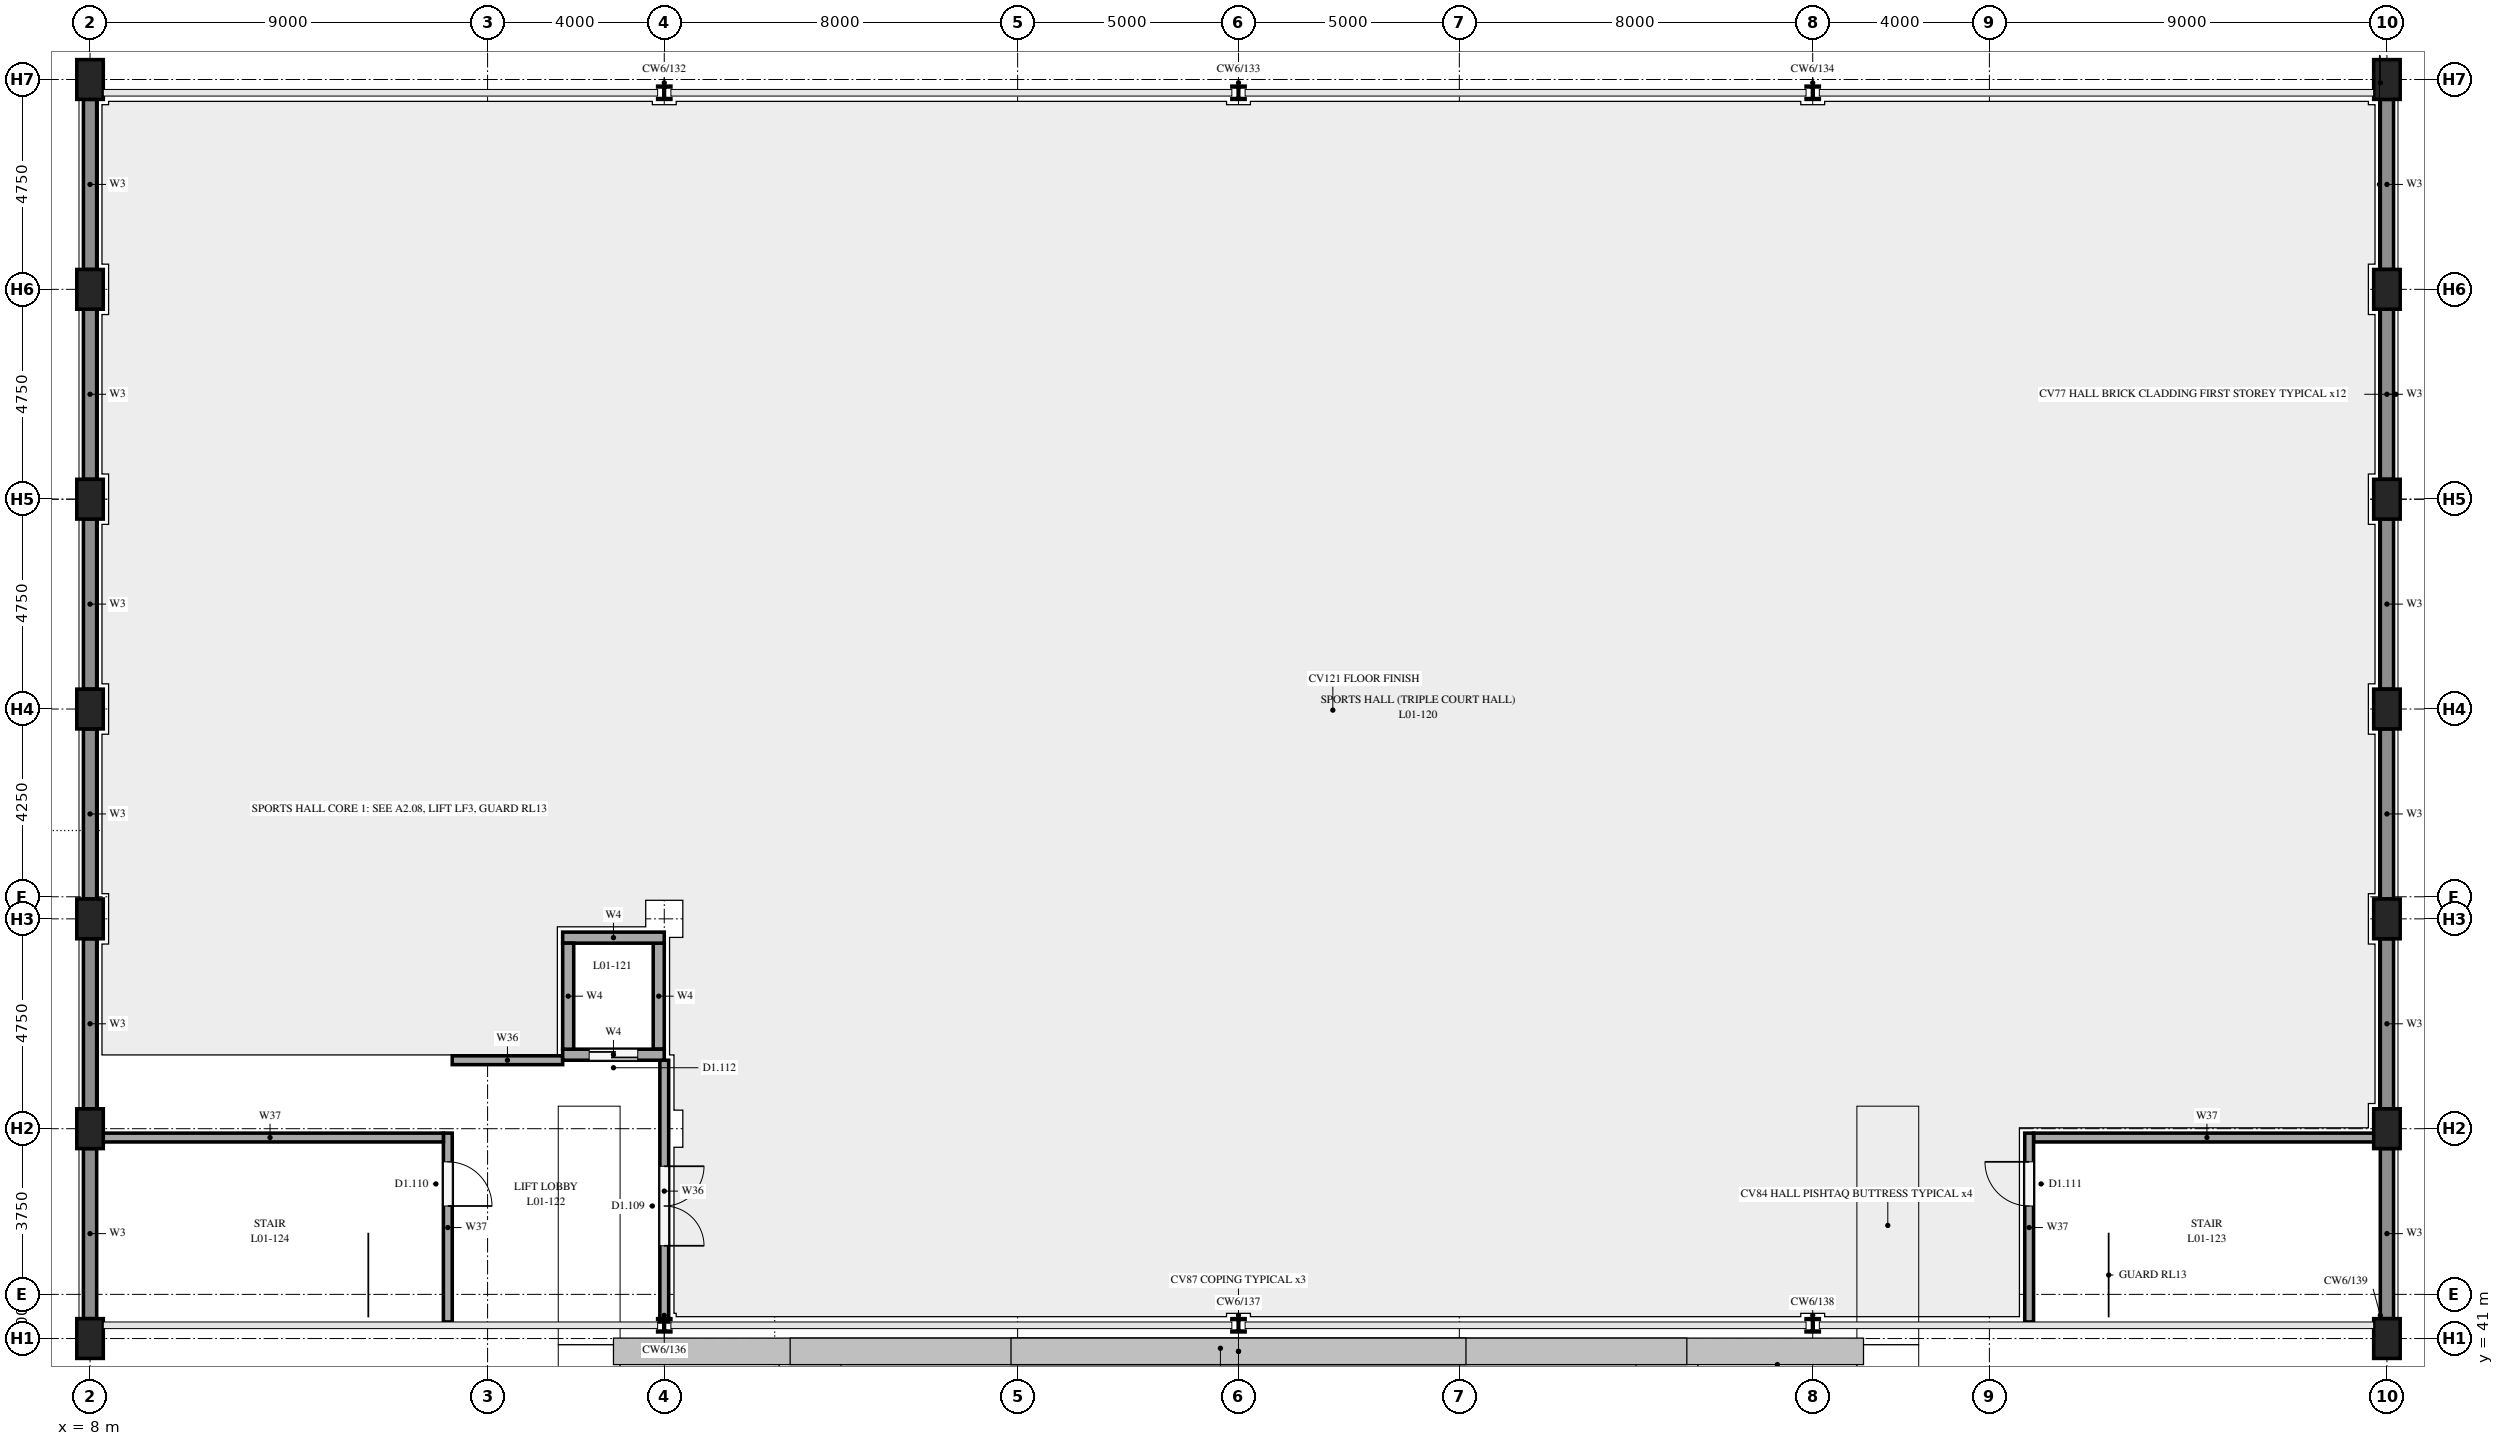
"""IFC4 building model, lengths in metres.
Left out: names, types, materials, properties, quantities, classifications, styles, units other than length and angle.
Written with IfcOpenShell. Run it as: python <this file> out.ifc"""

import sys

from ifc_helpers import new_model, si_unit, direction, frame, frame_2d, origin, origin_2d, place, context, subcontext, project, spatial, rectangle, i_section, extrude, element, fill, save


model = new_model("IFC4")
c1 = context("Model", 3, precision=1e-05, world=origin(), true_north=direction((0.0, 1.0)))
c2 = subcontext(c1, "Body", "Model", "MODEL_VIEW")
j1 = project(units=[si_unit("LENGTHUNIT", "METRE"), si_unit("PLANEANGLEUNIT", "RADIAN")], contexts=[c1])
p1 = place(None, origin())
s1 = spatial("IfcSite", under=j1, at=p1, CompositionType="ELEMENT")
p2 = place(p1, origin())
s2 = spatial("IfcBuilding", under=s1, at=p2, CompositionType="ELEMENT")
p3 = place(p2, frame((0.0, 0.0, 4.5)))
s3 = spatial("IfcBuildingStorey", under=s2, at=p3, CompositionType="ELEMENT", Elevation=4.5)
for number, where, z_axis, x_axis in (
    (1, (8.0, 41.0, 0.0), (0.0, 0.0, 1.0), (1.0, 0.0, 0.0)),
    (2, (8.0, 45.75, 0.0), (0.0, 0.0, 1.0), (1.0, 0.0, 0.0)),
    (3, (8.0, 50.5, 0.0), (0.0, 0.0, 1.0), (1.0, 0.0, 0.0)),
    (4, (8.0, 55.25, 0.0), (0.0, 0.0, 1.0), (1.0, 0.0, 0.0)),
    (5, (8.0, 60.0, 0.0), (0.0, 0.0, 1.0), (1.0, 0.0, 0.0)),
    (6, (8.0, 64.75, 0.0), (0.0, 0.0, 1.0), (1.0, 0.0, 0.0)),
    (7, (8.0, 69.5, 0.0), (0.0, 0.0, 1.0), (1.0, 0.0, 0.0)),
    (8, (60.0, 41.0, 0.0), (0.0, 0.0, 1.0), (1.0, 0.0, 0.0)),
    (9, (60.0, 45.75, 0.0), (0.0, 0.0, 1.0), (1.0, 0.0, 0.0)),
    (10, (60.0, 50.5, 0.0), (0.0, 0.0, 1.0), (1.0, 0.0, 0.0)),
    (11, (60.0, 55.25, 0.0), (0.0, 0.0, 1.0), (1.0, 0.0, 0.0)),
    (12, (60.0, 60.0, 0.0), (0.0, 0.0, 1.0), (1.0, 0.0, 0.0)),
    (13, (60.0, 64.75, 0.0), (0.0, 0.0, 1.0), (1.0, 0.0, 0.0)),
    (14, (60.0, 69.5, 0.0), (0.0, 0.0, 1.0), (1.0, 0.0, 0.0)),
):
    element("IfcColumn", number, at=place(p3, frame(where, z_axis=z_axis, x_axis=x_axis)), inside=s3, PredefinedType="COLUMN", context=c2, shape_type="SweptSolid", body=[
        extrude(rectangle(XDim=0.6, YDim=0.9, at=origin_2d()), origin(), (0.0, 0.0, 1.0), 3.6),
    ])
for number, where, z_axis, x_axis in (
    (15, (8.0, 41.45, 0.0), (0.0, 0.0, 1.0), (0.0, 1.0, 0.0)),
    (16, (8.0, 46.2, 0.0), (0.0, 0.0, 1.0), (0.0, 1.0, 0.0)),
    (17, (8.0, 50.95, 0.0), (0.0, 0.0, 1.0), (0.0, 1.0, 0.0)),
    (18, (8.0, 55.7, 0.0), (0.0, 0.0, 1.0), (0.0, 1.0, 0.0)),
    (19, (8.0, 60.45, 0.0), (0.0, 0.0, 1.0), (0.0, 1.0, 0.0)),
    (20, (8.0, 65.2, 0.0), (0.0, 0.0, 1.0), (0.0, 1.0, 0.0)),
    (21, (60.0, 41.45, 0.0), (0.0, 0.0, 1.0), (0.0, 1.0, 0.0)),
    (22, (60.0, 46.2, 0.0), (0.0, 0.0, 1.0), (0.0, 1.0, 0.0)),
    (23, (60.0, 50.95, 0.0), (0.0, 0.0, 1.0), (0.0, 1.0, 0.0)),
    (24, (60.0, 55.7, 0.0), (0.0, 0.0, 1.0), (0.0, 1.0, 0.0)),
    (25, (60.0, 60.45, 0.0), (0.0, 0.0, 1.0), (0.0, 1.0, 0.0)),
    (26, (60.0, 65.2, 0.0), (0.0, 0.0, 1.0), (0.0, 1.0, 0.0)),
):
    element("IfcWall", number, at=place(p3, frame(where, z_axis=z_axis, x_axis=x_axis)), inside=s3, PredefinedType="SOLIDWALL", context=c2, shape_type="SweptSolid", body=[
        extrude(rectangle(XDim=3.85, YDim=0.3, at=frame_2d((1.925, 0.0))), origin(), (0.0, 0.0, 1.0), 3.6),
    ])
for number, where, z_axis, x_axis in (
    (27, (21.0, 41.3, 0.0), (0.0, 0.0, 1.0), (1.0, 0.0, 0.0)),
    (28, (34.0, 41.3, 0.0), (0.0, 0.0, 1.0), (1.0, 0.0, 0.0)),
    (29, (47.0, 41.3, 0.0), (0.0, 0.0, 1.0), (1.0, 0.0, 0.0)),
    (30, (21.0, 69.2, 0.0), (0.0, 0.0, 1.0), (1.0, 0.0, 0.0)),
    (31, (34.0, 69.2, 0.0), (0.0, 0.0, 1.0), (1.0, 0.0, 0.0)),
    (32, (47.0, 69.2, 0.0), (0.0, 0.0, 1.0), (1.0, 0.0, 0.0)),
):
    element("IfcColumn", number, at=place(p3, frame(where, z_axis=z_axis, x_axis=x_axis)), inside=s3, PredefinedType="COLUMN", context=c2, shape_type="SweptSolid", body=[
        extrude(i_section(OverallWidth=0.3, OverallDepth=0.3, WebThickness=0.011, FlangeThickness=0.019, FilletRadius=0.027, at=origin_2d()), origin(), (0.0, 0.0, 1.0), 3.6),
    ])
p4 = place(p3, frame((18.7, 47.425, 0.0), z_axis=(0.0, 0.0, 1.0), x_axis=(1.0, 0.0, 0.0)))
e33 = element("IfcWall", 33, at=p4, inside=s3, PredefinedType="SOLIDWALL", context=c2, shape_type="SweptSolid", body=[
    extrude(rectangle(XDim=2.3, YDim=0.25, at=frame_2d((1.15, 0.0))), origin(), (0.0, 0.0, 1.0), 3.35),
])
p5 = place(p4, frame((0.6, 0.0, 0.0)))
e34 = element("IfcOpeningElement", 34, at=p5, cuts=e33, PredefinedType="OPENING", context=c2, shape_type="SweptSolid", body=[
    extrude(rectangle(XDim=1.1, YDim=2.1, at=frame_2d((0.55, 1.05))), frame((0.0, 0.135, 0.0), z_axis=(0.0, -1.0, 0.0), x_axis=(1.0, 0.0, 0.0)), (0.0, 0.0, 1.0), 0.27),
])
p6 = place(p3, frame((18.7, 50.075, 0.0), z_axis=(0.0, 0.0, 1.0), x_axis=(1.0, 0.0, 0.0)))
e35 = element("IfcWall", 35, at=p6, inside=s3, PredefinedType="SOLIDWALL", context=c2, shape_type="SweptSolid", body=[
    extrude(rectangle(XDim=2.3, YDim=0.25, at=frame_2d((1.15, 0.0))), origin(), (0.0, 0.0, 1.0), 3.35),
])
for number, where, z_axis, x_axis in (
    (36, (18.825, 47.55, 0.0), (0.0, 0.0, 1.0), (0.0, 1.0, 0.0)),
    (37, (20.875, 47.55, 0.0), (0.0, 0.0, 1.0), (0.0, 1.0, 0.0)),
):
    element("IfcWall", number, at=place(p3, frame(where, z_axis=z_axis, x_axis=x_axis)), inside=s3, PredefinedType="SOLIDWALL", context=c2, shape_type="SweptSolid", body=[
        extrude(rectangle(XDim=2.4, YDim=0.25, at=frame_2d((1.2, 0.0))), origin(), (0.0, 0.0, 1.0), 3.35),
    ])
p7 = place(p3, frame((16.1, 41.375, 0.0), z_axis=(0.0, 0.0, 1.0), x_axis=(0.0, 1.0, 0.0)))
e38 = element("IfcWall", 38, at=p7, inside=s3, PredefinedType="SOLIDWALL", context=c2, shape_type="SweptSolid", body=[
    extrude(rectangle(XDim=4.275, YDim=0.2, at=frame_2d((2.137, 0.0))), origin(), (0.0, 0.0, 1.0), 3.35),
])
p8 = place(p7, frame((2.625, 0.0, 0.0)))
e39 = element("IfcOpeningElement", 39, at=p8, cuts=e38, PredefinedType="OPENING", context=c2, shape_type="SweptSolid", body=[
    extrude(rectangle(XDim=1.0, YDim=2.1, at=frame_2d((0.5, 1.05))), frame((0.0, 0.11, 0.0), z_axis=(0.0, -1.0, 0.0), x_axis=(1.0, 0.0, 0.0)), (0.0, 0.0, 1.0), 0.22),
])
p9 = place(p3, frame((8.15, 45.55, 0.0), z_axis=(0.0, 0.0, 1.0), x_axis=(1.0, 0.0, 0.0)))
e40 = element("IfcWall", 40, at=p9, inside=s3, PredefinedType="SOLIDWALL", context=c2, shape_type="SweptSolid", body=[
    extrude(rectangle(XDim=7.85, YDim=0.2, at=frame_2d((3.925, 0.0))), origin(), (0.0, 0.0, 1.0), 3.35),
])
p10 = place(p3, frame((21.0, 41.375, 0.0), z_axis=(0.0, 0.0, 1.0), x_axis=(0.0, 1.0, 0.0)))
e41 = element("IfcWall", 41, at=p10, inside=s3, PredefinedType="PARTITIONING", context=c2, shape_type="SweptSolid", body=[
    extrude(rectangle(XDim=5.925, YDim=0.2, at=frame_2d((2.962, 0.0))), origin(), (0.0, 0.0, 1.0), 3.35),
])
p11 = place(p10, frame((1.725, 0.0, 0.0)))
e42 = element("IfcOpeningElement", 42, at=p11, cuts=e41, PredefinedType="OPENING", context=c2, shape_type="SweptSolid", body=[
    extrude(rectangle(XDim=1.8, YDim=2.1, at=frame_2d((0.9, 1.05))), frame((0.0, 0.11, 0.0), z_axis=(0.0, -1.0, 0.0), x_axis=(1.0, 0.0, 0.0)), (0.0, 0.0, 1.0), 0.22),
])
p12 = place(p3, frame((16.2, 47.3, 0.0), z_axis=(0.0, 0.0, 1.0), x_axis=(1.0, 0.0, 0.0)))
e43 = element("IfcWall", 43, at=p12, inside=s3, PredefinedType="PARTITIONING", context=c2, shape_type="SweptSolid", body=[
    extrude(rectangle(XDim=2.5, YDim=0.2, at=frame_2d((1.25, 0.0))), origin(), (0.0, 0.0, 1.0), 3.35),
])
p13 = place(p3, frame((51.9, 41.375, 0.0), z_axis=(0.0, 0.0, 1.0), x_axis=(0.0, 1.0, 0.0)))
e44 = element("IfcWall", 44, at=p13, inside=s3, PredefinedType="SOLIDWALL", context=c2, shape_type="SweptSolid", body=[
    extrude(rectangle(XDim=4.275, YDim=0.2, at=frame_2d((2.137, 0.0))), origin(), (0.0, 0.0, 1.0), 3.35),
])
p14 = place(p13, frame((2.625, 0.0, 0.0)))
e45 = element("IfcOpeningElement", 45, at=p14, cuts=e44, PredefinedType="OPENING", context=c2, shape_type="SweptSolid", body=[
    extrude(rectangle(XDim=1.0, YDim=2.1, at=frame_2d((0.5, 1.05))), frame((0.0, 0.11, 0.0), z_axis=(0.0, -1.0, 0.0), x_axis=(1.0, 0.0, 0.0)), (0.0, 0.0, 1.0), 0.22),
])
p15 = place(p3, frame((52.0, 45.55, 0.0), z_axis=(0.0, 0.0, 1.0), x_axis=(1.0, 0.0, 0.0)))
e46 = element("IfcWall", 46, at=p15, inside=s3, PredefinedType="SOLIDWALL", context=c2, shape_type="SweptSolid", body=[
    extrude(rectangle(XDim=7.85, YDim=0.2, at=frame_2d((3.925, 0.0))), origin(), (0.0, 0.0, 1.0), 3.35),
])
p16 = place(p5, frame((1.1, 0.0, 0.0), z_axis=(0.0, 0.0, 1.0), x_axis=(-1.0, 0.0, 0.0)))
e47 = element("IfcDoor", 47, at=p16, inside=s3, OperationType="SLIDING_TO_LEFT", PredefinedType="DOOR", context=c2, shape_type="SweptSolid", body=[
    extrude(rectangle(XDim=1.1, YDim=2.1, at=frame_2d((0.55, 1.05))), frame((0.0, 0.025, 0.0), z_axis=(0.0, -1.0, 0.0), x_axis=(1.0, 0.0, 0.0)), (0.0, 0.0, 1.0), 0.05),
])
fill(e34, e47)
p17 = place(p8, frame((1.0, 0.0, 0.0), z_axis=(0.0, 0.0, 1.0), x_axis=(-1.0, 0.0, 0.0)))
e48 = element("IfcDoor", 48, at=p17, inside=s3, OperationType="SINGLE_SWING_LEFT", PredefinedType="DOOR", context=c2, shape_type="SweptSolid", body=[
    extrude(rectangle(XDim=1.0, YDim=2.1, at=frame_2d((0.5, 1.05))), frame((0.0, 0.025, 0.0), z_axis=(0.0, -1.0, 0.0), x_axis=(1.0, 0.0, 0.0)), (0.0, 0.0, 1.0), 0.05),
])
fill(e39, e48)
p18 = place(p11, frame((1.8, 0.0, 0.0), z_axis=(0.0, 0.0, 1.0), x_axis=(-1.0, 0.0, 0.0)))
e49 = element("IfcDoor", 49, at=p18, inside=s3, OperationType="DOUBLE_DOOR_SINGLE_SWING", PredefinedType="DOOR", context=c2, shape_type="SweptSolid", body=[
    extrude(rectangle(XDim=1.8, YDim=2.1, at=frame_2d((0.9, 1.05))), frame((0.0, 0.025, 0.0), z_axis=(0.0, -1.0, 0.0), x_axis=(1.0, 0.0, 0.0)), (0.0, 0.0, 1.0), 0.05),
])
fill(e42, e49)
p19 = place(p14, origin())
e50 = element("IfcDoor", 50, at=p19, inside=s3, OperationType="SINGLE_SWING_RIGHT", PredefinedType="DOOR", context=c2, shape_type="SweptSolid", body=[
    extrude(rectangle(XDim=1.0, YDim=2.1, at=frame_2d((0.5, 1.05))), frame((0.0, 0.025, 0.0), z_axis=(0.0, -1.0, 0.0), x_axis=(1.0, 0.0, 0.0)), (0.0, 0.0, 1.0), 0.05),
])
fill(e45, e50)
save(model, sys.argv[1])
